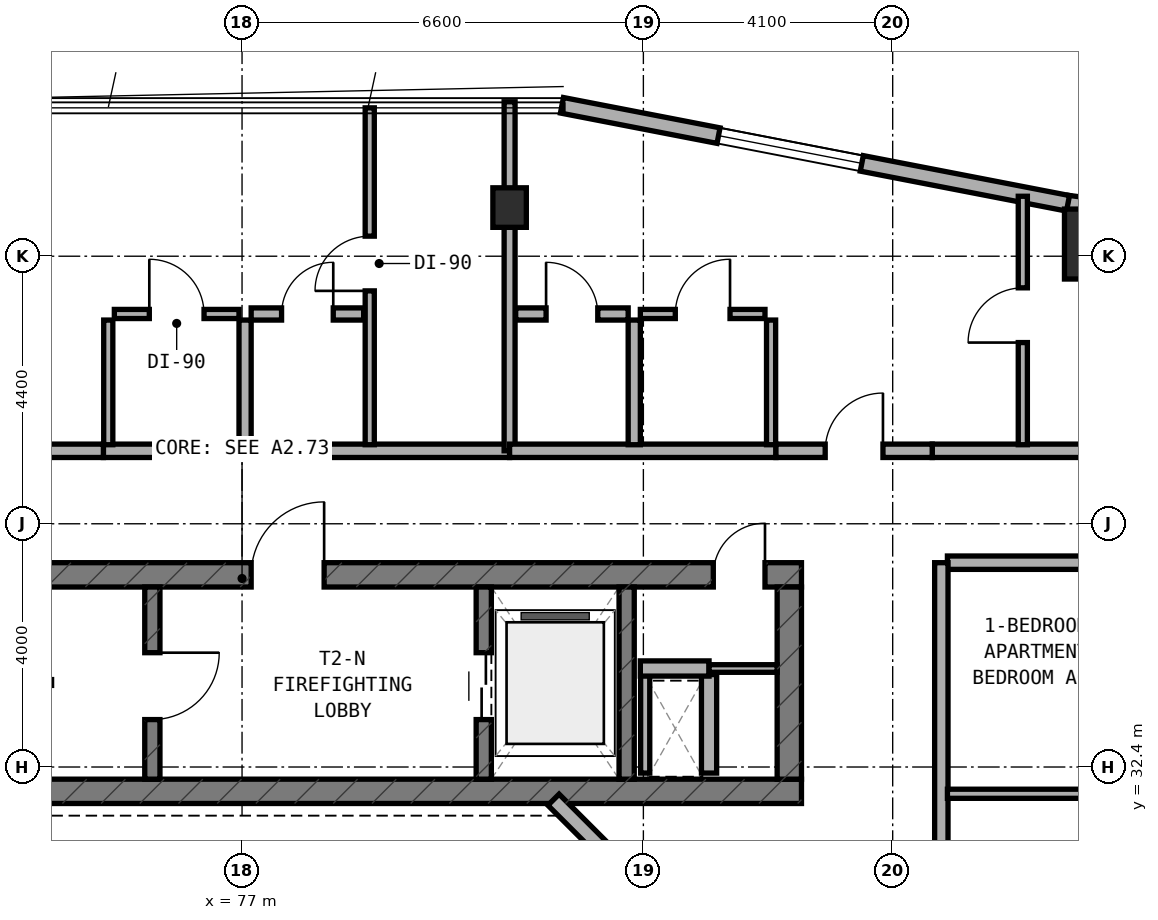
"""IFC4 building model, lengths in metres.
Left out: names, types, materials, properties, quantities, classifications, styles, units other than length and angle.
Written with IfcOpenShell. Run it as: python <this file> out.ifc"""

import sys

from ifc_helpers import new_model, si_unit, direction, frame, frame_2d, origin, origin_2d, place, context, subcontext, project, spatial, rectangle, extrude, element, fill, save


model = new_model("IFC4")
c1 = context("Model", 3, precision=1e-05, world=origin(), true_north=direction((0.0, 1.0)))
c2 = subcontext(c1, "Body", "Model", "MODEL_VIEW")
j1 = project(units=[si_unit("LENGTHUNIT", "METRE"), si_unit("PLANEANGLEUNIT", "RADIAN")], contexts=[c1])
p1 = place(None, origin())
s1 = spatial("IfcSite", under=j1, at=p1, CompositionType="ELEMENT")
p2 = place(p1, origin())
s2 = spatial("IfcBuilding", under=s1, at=p2, CompositionType="ELEMENT")
p3 = place(p2, frame((0.0, 0.0, 116.0)))
s3 = spatial("IfcBuildingStorey", under=s2, at=p3, CompositionType="ELEMENT", Elevation=116.0)
p4 = place(p3, frame((68.0, 32.0, 0.0), z_axis=(0.0, 0.0, 1.0), x_axis=(1.0, 0.0, 0.0)))
e1 = element("IfcWall", 1, at=p4, inside=s3, PredefinedType="SHEAR", context=c2, shape_type="SweptSolid", body=[
    extrude(rectangle(XDim=18.2, YDim=0.4, at=frame_2d((9.1, 0.0))), origin(), (0.0, 0.0, 1.0), 3.5),
])
p5 = place(p3, frame((68.0, 35.56, 0.0), z_axis=(0.0, 0.0, 1.0), x_axis=(1.0, 0.0, 0.0)))
e2 = element("IfcWall", 2, at=p5, inside=s3, PredefinedType="SHEAR", context=c2, shape_type="SweptSolid", body=[
    extrude(rectangle(XDim=18.2, YDim=0.4, at=frame_2d((9.1, 0.0))), origin(), (0.0, 0.0, 1.0), 3.5),
])
p6 = place(p5, frame((9.15, 0.0, 0.0)))
e3 = element("IfcOpeningElement", 3, at=p6, cuts=e2, PredefinedType="OPENING", context=c2, shape_type="SweptSolid", body=[
    extrude(rectangle(XDim=1.2, YDim=2.15, at=frame_2d((0.6, 1.075))), frame((0.0, 0.21, 0.0), z_axis=(0.0, -1.0, 0.0), x_axis=(1.0, 0.0, 0.0)), (0.0, 0.0, 1.0), 0.42),
])
p7 = place(p5, frame((16.75, 0.0, 0.0)))
e4 = element("IfcOpeningElement", 4, at=p7, cuts=e2, PredefinedType="OPENING", context=c2, shape_type="SweptSolid", body=[
    extrude(rectangle(XDim=0.85, YDim=2.1, at=frame_2d((0.425, 1.05))), frame((0.0, 0.21, 0.0), z_axis=(0.0, -1.0, 0.0), x_axis=(1.0, 0.0, 0.0)), (0.0, 0.0, 1.0), 0.42),
])
p8 = place(p3, frame((86.0, 32.2, 0.0), z_axis=(0.0, 0.0, 1.0), x_axis=(0.0, 1.0, 0.0)))
e5 = element("IfcWall", 5, at=p8, inside=s3, PredefinedType="SHEAR", context=c2, shape_type="SweptSolid", body=[
    extrude(rectangle(XDim=3.16, YDim=0.4, at=frame_2d((1.58, 0.0))), origin(), (0.0, 0.0, 1.0), 3.5),
])
p9 = place(p3, frame((75.525, 32.2, 0.0), z_axis=(0.0, 0.0, 1.0), x_axis=(0.0, 1.0, 0.0)))
e6 = element("IfcWall", 6, at=p9, inside=s3, PredefinedType="STANDARD", context=c2, shape_type="SweptSolid", body=[
    extrude(rectangle(XDim=3.16, YDim=0.25, at=frame_2d((1.58, 0.0))), origin(), (0.0, 0.0, 1.0), 3.18),
])
p10 = place(p9, frame((0.98, 0.0, 0.0)))
e7 = element("IfcOpeningElement", 7, at=p10, cuts=e6, PredefinedType="OPENING", context=c2, shape_type="SweptSolid", body=[
    extrude(rectangle(XDim=1.1, YDim=2.15, at=frame_2d((0.55, 1.075))), frame((0.0, 0.135, 0.0), z_axis=(0.0, -1.0, 0.0), x_axis=(1.0, 0.0, 0.0)), (0.0, 0.0, 1.0), 0.27),
])
p11 = place(p3, frame((80.975, 32.2, 0.0), z_axis=(0.0, 0.0, 1.0), x_axis=(0.0, 1.0, 0.0)))
e8 = element("IfcWall", 8, at=p11, inside=s3, PredefinedType="STANDARD", context=c2, shape_type="SweptSolid", body=[
    extrude(rectangle(XDim=3.16, YDim=0.25, at=frame_2d((1.58, 0.0))), origin(), (0.0, 0.0, 1.0), 3.18),
])
p12 = place(p11, frame((0.98, 0.0, 0.0)))
e9 = element("IfcOpeningElement", 9, at=p12, cuts=e8, PredefinedType="OPENING", context=c2, shape_type="SweptSolid", body=[
    extrude(rectangle(XDim=1.1, YDim=2.15, at=frame_2d((0.55, 1.075))), frame((0.0, 0.135, 0.0), z_axis=(0.0, -1.0, 0.0), x_axis=(1.0, 0.0, 0.0)), (0.0, 0.0, 1.0), 0.27),
])
p13 = place(p3, frame((83.325, 32.2, 0.0), z_axis=(0.0, 0.0, 1.0), x_axis=(0.0, 1.0, 0.0)))
e10 = element("IfcWall", 10, at=p13, inside=s3, PredefinedType="STANDARD", context=c2, shape_type="SweptSolid", body=[
    extrude(rectangle(XDim=3.16, YDim=0.25, at=frame_2d((1.58, 0.0))), origin(), (0.0, 0.0, 1.0), 3.18),
])
p14 = place(p3, frame((81.4, 41.6, 0.0), z_axis=(0.0, 0.0, 1.0), x_axis=(1.0, 0.0, 0.0)))
e11 = element("IfcColumn", 11, at=p14, inside=s3, PredefinedType="COLUMN", context=c2, shape_type="SweptSolid", body=[
    extrude(rectangle(XDim=0.55, YDim=0.65, at=origin_2d()), origin(), (0.0, 0.0, 1.0), 3.5),
])
p15 = place(p3, frame((91.0, 41.0, 0.0), z_axis=(0.0, 0.0, 1.0), x_axis=(1.0, 0.0, 0.0)))
e12 = element("IfcColumn", 12, at=p15, inside=s3, PredefinedType="COLUMN", context=c2, shape_type="SweptSolid", body=[
    extrude(rectangle(XDim=0.95, YDim=1.15, at=origin_2d()), origin(), (0.0, 0.0, 1.0), 3.5),
])
p16 = place(p3, frame((91.281, 41.579, 0.0), z_axis=(0.0, 0.0, 1.0), x_axis=(-0.991433279471, 0.130614135366, 0.0)))
e13 = element("IfcWall", 13, at=p16, inside=s3, PredefinedType="STANDARD", context=c2, shape_type="SweptSolid", body=[
    extrude(rectangle(XDim=0.712, YDim=0.26, at=frame_2d((0.356, 0.0))), origin(), (0.0, 0.0, 1.0), 3.18),
])
p17 = place(p3, frame((90.583, 41.67, 0.0), z_axis=(0.0, 0.0, 1.0), x_axis=(-0.981750199588, 0.190175039396, 0.0)))
e14 = element("IfcWall", 14, at=p17, inside=s3, PredefinedType="STANDARD", context=c2, shape_type="SweptSolid", body=[
    extrude(rectangle(XDim=8.477, YDim=0.26, at=frame_2d((4.238, 0.0))), origin(), (0.0, 0.0, 1.0), 3.18),
])
p18 = place(p17, frame((3.454, 0.0, 0.8)))
e15 = element("IfcOpeningElement", 15, at=p18, cuts=e14, PredefinedType="OPENING", context=c2, shape_type="SweptSolid", body=[
    extrude(rectangle(XDim=2.4, YDim=1.6, at=frame_2d((1.2, 0.8))), frame((0.0, 0.14, 0.0), z_axis=(0.0, -1.0, 0.0), x_axis=(1.0, 0.0, 0.0)), (0.0, 0.0, 1.0), 0.28),
])
p19 = place(p3, frame((83.756, 30.228, 0.0), z_axis=(0.0, 0.0, 1.0), x_axis=(-0.707106781187, 0.707106781187, 0.0)))
e16 = element("IfcWall", 16, at=p19, inside=s3, PredefinedType="STANDARD", context=c2, shape_type="SweptSolid", body=[
    extrude(rectangle(XDim=2.311, YDim=0.26, at=frame_2d((1.155, 0.0))), origin(), (0.0, 0.0, 1.0), 3.18),
])
p20 = place(p3, frame((83.63, 32.3, 0.0), z_axis=(0.0, 0.0, 1.0), x_axis=(0.0, 1.0, 0.0)))
e17 = element("IfcWall", 17, at=p20, inside=s3, PredefinedType="PARTITIONING", context=c2, shape_type="SweptSolid", body=[
    extrude(rectangle(XDim=1.62, YDim=0.15, at=frame_2d((0.81, 0.0))), origin(), (0.0, 0.0, 1.0), 2.755),
])
p21 = place(p3, frame((84.68, 32.3, 0.0), z_axis=(0.0, 0.0, 1.0), x_axis=(0.0, 1.0, 0.0)))
e18 = element("IfcWall", 18, at=p21, inside=s3, PredefinedType="SOLIDWALL", context=c2, shape_type="SweptSolid", body=[
    extrude(rectangle(XDim=1.62, YDim=0.25, at=frame_2d((0.81, 0.0))), origin(), (0.0, 0.0, 1.0), 3.18),
])
p22 = place(p3, frame((83.55, 34.02, 0.0), z_axis=(0.0, 0.0, 1.0), x_axis=(1.0, 0.0, 0.0)))
e19 = element("IfcWall", 19, at=p22, inside=s3, PredefinedType="SOLIDWALL", context=c2, shape_type="SweptSolid", body=[
    extrude(rectangle(XDim=1.13, YDim=0.25, at=frame_2d((0.565, 0.0))), origin(), (0.0, 0.0, 1.0), 3.18),
])
p23 = place(p3, frame((84.68, 34.02, 0.0), z_axis=(0.0, 0.0, 1.0), x_axis=(1.0, 0.0, 0.0)))
e20 = element("IfcWall", 20, at=p23, inside=s3, PredefinedType="PARTITIONING", context=c2, shape_type="SweptSolid", body=[
    extrude(rectangle(XDim=1.12, YDim=0.125, at=frame_2d((0.56, 0.0))), origin(), (0.0, 0.0, 1.0), 3.18),
])
p24 = place(p3, frame((74.72, 37.6, 0.0), z_axis=(0.0, 0.0, 1.0), x_axis=(1.0, 0.0, 0.0)))
e21 = element("IfcWall", 21, at=p24, inside=s3, PredefinedType="SOLIDWALL", context=c2, shape_type="SweptSolid", body=[
    extrude(rectangle(XDim=6.68, YDim=0.22, at=frame_2d((3.34, 0.0))), origin(), (0.0, 0.0, 1.0), 2.755),
])
p25 = place(p3, frame((65.85, 37.6, 0.0), z_axis=(0.0, 0.0, 1.0), x_axis=(1.0, 0.0, 0.0)))
e22 = element("IfcWall", 22, at=p25, inside=s3, PredefinedType="SOLIDWALL", context=c2, shape_type="SweptSolid", body=[
    extrude(rectangle(XDim=8.87, YDim=0.22, at=frame_2d((4.435, 0.0))), origin(), (0.0, 0.0, 1.0), 2.755),
])
p26 = place(p25, frame((3.96, 0.0, 0.0)))
e23 = element("IfcOpeningElement", 23, at=p26, cuts=e22, PredefinedType="OPENING", context=c2, shape_type="SweptSolid", body=[
    extrude(rectangle(XDim=0.95, YDim=2.1, at=frame_2d((0.475, 1.05))), frame((0.0, 0.12, 0.0), z_axis=(0.0, -1.0, 0.0), x_axis=(1.0, 0.0, 0.0)), (0.0, 0.0, 1.0), 0.24),
])
p27 = place(p3, frame((79.1, 37.7, 0.0), z_axis=(0.0, 0.0, 1.0), x_axis=(0.0, 1.0, 0.0)))
e24 = element("IfcWall", 24, at=p27, inside=s3, PredefinedType="PARTITIONING", context=c2, shape_type="SweptSolid", body=[
    extrude(rectangle(XDim=5.54, YDim=0.15, at=frame_2d((2.77, 0.0))), origin(), (0.0, 0.0, 1.0), 2.855),
])
p28 = place(p27, frame((2.53, 0.0, 0.0)))
e25 = element("IfcOpeningElement", 25, at=p28, cuts=e24, PredefinedType="OPENING", context=c2, shape_type="SweptSolid", body=[
    extrude(rectangle(XDim=0.9, YDim=2.1, at=frame_2d((0.45, 1.05))), frame((0.0, 0.085, 0.0), z_axis=(0.0, -1.0, 0.0), x_axis=(1.0, 0.0, 0.0)), (0.0, 0.0, 1.0), 0.17),
])
p29 = place(p3, frame((77.05, 37.7, 0.0), z_axis=(0.0, 0.0, 1.0), x_axis=(0.0, 1.0, 0.0)))
e26 = element("IfcWall", 26, at=p29, inside=s3, PredefinedType="PLUMBINGWALL", context=c2, shape_type="SweptSolid", body=[
    extrude(rectangle(XDim=2.05, YDim=0.2, at=frame_2d((1.025, 0.0))), origin(), (0.0, 0.0, 1.0), 2.855),
])
p30 = place(p3, frame((74.8, 37.7, 0.0), z_axis=(0.0, 0.0, 1.0), x_axis=(0.0, 1.0, 0.0)))
e27 = element("IfcWall", 27, at=p30, inside=s3, PredefinedType="PARTITIONING", context=c2, shape_type="SweptSolid", body=[
    extrude(rectangle(XDim=2.05, YDim=0.15, at=frame_2d((1.025, 0.0))), origin(), (0.0, 0.0, 1.0), 2.855),
])
p31 = place(p3, frame((77.15, 39.85, 0.0), z_axis=(0.0, 0.0, 1.0), x_axis=(1.0, 0.0, 0.0)))
e28 = element("IfcWall", 28, at=p31, inside=s3, PredefinedType="PLUMBINGWALL", context=c2, shape_type="SweptSolid", body=[
    extrude(rectangle(XDim=1.85, YDim=0.2, at=frame_2d((0.925, 0.0))), origin(), (0.0, 0.0, 1.0), 3.18),
])
p32 = place(p31, frame((0.5, 0.0, 0.0)))
e29 = element("IfcOpeningElement", 29, at=p32, cuts=e28, PredefinedType="OPENING", context=c2, shape_type="SweptSolid", body=[
    extrude(rectangle(XDim=0.85, YDim=2.1, at=frame_2d((0.425, 1.05))), frame((0.0, 0.11, 0.0), z_axis=(0.0, -1.0, 0.0), x_axis=(1.0, 0.0, 0.0)), (0.0, 0.0, 1.0), 0.22),
])
p33 = place(p3, frame((74.9, 39.85, 0.0), z_axis=(0.0, 0.0, 1.0), x_axis=(1.0, 0.0, 0.0)))
e30 = element("IfcWall", 30, at=p33, inside=s3, PredefinedType="PARTITIONING", context=c2, shape_type="SweptSolid", body=[
    extrude(rectangle(XDim=2.05, YDim=0.15, at=frame_2d((1.025, 0.0))), origin(), (0.0, 0.0, 1.0), 3.18),
])
p34 = place(p33, frame((0.575, 0.0, 0.0)))
e31 = element("IfcOpeningElement", 31, at=p34, cuts=e30, PredefinedType="OPENING", context=c2, shape_type="SweptSolid", body=[
    extrude(rectangle(XDim=0.9, YDim=2.1, at=frame_2d((0.45, 1.05))), frame((0.0, 0.085, 0.0), z_axis=(0.0, -1.0, 0.0), x_axis=(1.0, 0.0, 0.0)), (0.0, 0.0, 1.0), 0.17),
])
p35 = place(p3, frame((81.4, 37.6, 0.0), z_axis=(0.0, 0.0, 1.0), x_axis=(0.0, 1.0, 0.0)))
e32 = element("IfcWall", 32, at=p35, inside=s3, PredefinedType="SOLIDWALL", context=c2, shape_type="SweptSolid", body=[
    extrude(rectangle(XDim=5.74, YDim=0.18, at=frame_2d((2.87, 0.0))), origin(), (0.0, 0.0, 1.0), 2.755),
])
p36 = place(p3, frame((81.4, 37.6, 0.0), z_axis=(0.0, 0.0, 1.0), x_axis=(1.0, 0.0, 0.0)))
e33 = element("IfcWall", 33, at=p36, inside=s3, PredefinedType="SOLIDWALL", context=c2, shape_type="SweptSolid", body=[
    extrude(rectangle(XDim=4.38, YDim=0.22, at=frame_2d((2.19, 0.0))), origin(), (0.0, 0.0, 1.0), 2.755),
])
p37 = place(p3, frame((88.35, 37.6, 0.0), z_axis=(0.0, 0.0, 1.0), x_axis=(1.0, 0.0, 0.0)))
e34 = element("IfcWall", 34, at=p37, inside=s3, PredefinedType="SOLIDWALL", context=c2, shape_type="SweptSolid", body=[
    extrude(rectangle(XDim=6.29, YDim=0.22, at=frame_2d((3.145, 0.0))), origin(), (0.0, 0.0, 1.0), 2.875),
])
p38 = place(p3, frame((85.78, 37.6, 0.0), z_axis=(0.0, 0.0, 1.0), x_axis=(1.0, 0.0, 0.0)))
e35 = element("IfcWall", 35, at=p38, inside=s3, PredefinedType="SOLIDWALL", context=c2, shape_type="SweptSolid", body=[
    extrude(rectangle(XDim=2.57, YDim=0.22, at=frame_2d((1.285, 0.0))), origin(), (0.0, 0.0, 1.0), 3.18),
])
p39 = place(p38, frame((0.81, 0.0, 0.0)))
e36 = element("IfcOpeningElement", 36, at=p39, cuts=e35, PredefinedType="OPENING", context=c2, shape_type="SweptSolid", body=[
    extrude(rectangle(XDim=0.95, YDim=2.1, at=frame_2d((0.475, 1.05))), frame((0.0, 0.12, 0.0), z_axis=(0.0, -1.0, 0.0), x_axis=(1.0, 0.0, 0.0)), (0.0, 0.0, 1.0), 0.24),
])
p40 = place(p3, frame((89.84, 37.7, 0.0), z_axis=(0.0, 0.0, 1.0), x_axis=(0.0, 1.0, 0.0)))
e37 = element("IfcWall", 37, at=p40, inside=s3, PredefinedType="PARTITIONING", context=c2, shape_type="SweptSolid", body=[
    extrude(rectangle(XDim=4.086, YDim=0.15, at=frame_2d((2.043, 0.0))), origin(), (0.0, 0.0, 1.0), 2.875),
])
p41 = place(p40, frame((1.68, 0.0, 0.0)))
e38 = element("IfcOpeningElement", 38, at=p41, cuts=e37, PredefinedType="OPENING", context=c2, shape_type="SweptSolid", body=[
    extrude(rectangle(XDim=0.9, YDim=2.1, at=frame_2d((0.45, 1.05))), frame((0.0, 0.085, 0.0), z_axis=(0.0, -1.0, 0.0), x_axis=(1.0, 0.0, 0.0)), (0.0, 0.0, 1.0), 0.17),
])
p42 = place(p3, frame((83.45, 37.7, 0.0), z_axis=(0.0, 0.0, 1.0), x_axis=(0.0, 1.0, 0.0)))
e39 = element("IfcWall", 39, at=p42, inside=s3, PredefinedType="PLUMBINGWALL", context=c2, shape_type="SweptSolid", body=[
    extrude(rectangle(XDim=2.05, YDim=0.2, at=frame_2d((1.025, 0.0))), origin(), (0.0, 0.0, 1.0), 3.18),
])
p43 = place(p3, frame((85.7, 37.7, 0.0), z_axis=(0.0, 0.0, 1.0), x_axis=(0.0, 1.0, 0.0)))
e40 = element("IfcWall", 40, at=p43, inside=s3, PredefinedType="PARTITIONING", context=c2, shape_type="SweptSolid", body=[
    extrude(rectangle(XDim=2.05, YDim=0.15, at=frame_2d((1.025, 0.0))), origin(), (0.0, 0.0, 1.0), 3.18),
])
p44 = place(p3, frame((81.5, 39.85, 0.0), z_axis=(0.0, 0.0, 1.0), x_axis=(1.0, 0.0, 0.0)))
e41 = element("IfcWall", 41, at=p44, inside=s3, PredefinedType="PLUMBINGWALL", context=c2, shape_type="SweptSolid", body=[
    extrude(rectangle(XDim=1.85, YDim=0.2, at=frame_2d((0.925, 0.0))), origin(), (0.0, 0.0, 1.0), 2.755),
])
p45 = place(p44, frame((0.5, 0.0, 0.0)))
e42 = element("IfcOpeningElement", 42, at=p45, cuts=e41, PredefinedType="OPENING", context=c2, shape_type="SweptSolid", body=[
    extrude(rectangle(XDim=0.85, YDim=2.1, at=frame_2d((0.425, 1.05))), frame((0.0, 0.11, 0.0), z_axis=(0.0, -1.0, 0.0), x_axis=(1.0, 0.0, 0.0)), (0.0, 0.0, 1.0), 0.22),
])
p46 = place(p3, frame((83.55, 39.85, 0.0), z_axis=(0.0, 0.0, 1.0), x_axis=(1.0, 0.0, 0.0)))
e43 = element("IfcWall", 43, at=p46, inside=s3, PredefinedType="PARTITIONING", context=c2, shape_type="SweptSolid", body=[
    extrude(rectangle(XDim=2.05, YDim=0.15, at=frame_2d((1.025, 0.0))), origin(), (0.0, 0.0, 1.0), 3.18),
])
p47 = place(p46, frame((0.575, 0.0, 0.0)))
e44 = element("IfcOpeningElement", 44, at=p47, cuts=e43, PredefinedType="OPENING", context=c2, shape_type="SweptSolid", body=[
    extrude(rectangle(XDim=0.9, YDim=2.1, at=frame_2d((0.45, 1.05))), frame((0.0, 0.085, 0.0), z_axis=(0.0, -1.0, 0.0), x_axis=(1.0, 0.0, 0.0)), (0.0, 0.0, 1.0), 0.17),
])
p48 = place(p3, frame((88.6, 35.76, 0.0), z_axis=(0.0, 0.0, 1.0), x_axis=(1.0, 0.0, 0.0)))
e45 = element("IfcWall", 45, at=p48, inside=s3, PredefinedType="SOLIDWALL", context=c2, shape_type="SweptSolid", body=[
    extrude(rectangle(XDim=5.88, YDim=0.22, at=frame_2d((2.94, 0.0))), origin(), (0.0, 0.0, 1.0), 2.875),
])
p49 = place(p3, frame((88.5, 27.9, 0.0), z_axis=(0.0, 0.0, 1.0), x_axis=(0.0, 1.0, 0.0)))
e46 = element("IfcWall", 46, at=p49, inside=s3, PredefinedType="SOLIDWALL", context=c2, shape_type="SweptSolid", body=[
    extrude(rectangle(XDim=7.86, YDim=0.22, at=frame_2d((3.93, 0.0))), origin(), (0.0, 0.0, 1.0), 2.755),
])
p50 = place(p49, frame((1.555, 0.0, 0.0)))
e47 = element("IfcOpeningElement", 47, at=p50, cuts=e46, PredefinedType="OPENING", context=c2, shape_type="SweptSolid", body=[
    extrude(rectangle(XDim=0.95, YDim=2.1, at=frame_2d((0.475, 1.05))), frame((0.0, 0.12, 0.0), z_axis=(0.0, -1.0, 0.0), x_axis=(1.0, 0.0, 0.0)), (0.0, 0.0, 1.0), 0.24),
])
p51 = place(p3, frame((88.6, 31.96, 0.0), z_axis=(0.0, 0.0, 1.0), x_axis=(1.0, 0.0, 0.0)))
e48 = element("IfcWall", 48, at=p51, inside=s3, PredefinedType="PARTITIONING", context=c2, shape_type="SweptSolid", body=[
    extrude(rectangle(XDim=5.94, YDim=0.15, at=frame_2d((2.97, 0.0))), origin(), (0.0, 0.0, 1.0), 2.875),
])
p52 = place(p51, frame((2.45, 0.0, 0.0)))
e49 = element("IfcOpeningElement", 49, at=p52, cuts=e48, PredefinedType="OPENING", context=c2, shape_type="SweptSolid", body=[
    extrude(rectangle(XDim=0.9, YDim=2.1, at=frame_2d((0.45, 1.05))), frame((0.0, 0.085, 0.0), z_axis=(0.0, -1.0, 0.0), x_axis=(1.0, 0.0, 0.0)), (0.0, 0.0, 1.0), 0.17),
])
p53 = place(p18, origin())
e50 = element("IfcWindow", 50, at=p53, inside=s3, PartitioningType="SINGLE_PANEL", PredefinedType="WINDOW", context=c2, shape_type="SweptSolid", body=[
    extrude(rectangle(XDim=2.4, YDim=1.6, at=frame_2d((1.2, 0.8))), frame((0.0, 0.03, 0.0), z_axis=(0.0, -1.0, 0.0), x_axis=(1.0, 0.0, 0.0)), (0.0, 0.0, 1.0), 0.06),
])
fill(e15, e50)
p54 = place(p10, frame((1.1, 0.0, 0.0), z_axis=(0.0, 0.0, 1.0), x_axis=(-1.0, 0.0, 0.0)))
e51 = element("IfcDoor", 51, at=p54, inside=s3, OperationType="SINGLE_SWING_LEFT", PredefinedType="DOOR", context=c2, shape_type="SweptSolid", body=[
    extrude(rectangle(XDim=1.1, YDim=2.15, at=frame_2d((0.55, 1.075))), frame((0.0, 0.025, 0.0), z_axis=(0.0, -1.0, 0.0), x_axis=(1.0, 0.0, 0.0)), (0.0, 0.0, 1.0), 0.05),
])
fill(e7, e51)
p55 = place(p6, origin())
e52 = element("IfcDoor", 52, at=p55, inside=s3, OperationType="SINGLE_SWING_RIGHT", PredefinedType="DOOR", context=c2, shape_type="SweptSolid", body=[
    extrude(rectangle(XDim=1.2, YDim=2.15, at=frame_2d((0.6, 1.075))), frame((0.0, 0.025, 0.0), z_axis=(0.0, -1.0, 0.0), x_axis=(1.0, 0.0, 0.0)), (0.0, 0.0, 1.0), 0.05),
])
fill(e3, e52)
p56 = place(p12, origin())
e53 = element("IfcDoor", 53, at=p56, inside=s3, OperationType="DOUBLE_DOOR_SLIDING", PredefinedType="DOOR", context=c2, shape_type="SweptSolid", body=[
    extrude(rectangle(XDim=1.1, YDim=2.15, at=frame_2d((0.55, 1.075))), frame((0.0, 0.025, 0.0), z_axis=(0.0, -1.0, 0.0), x_axis=(1.0, 0.0, 0.0)), (0.0, 0.0, 1.0), 0.05),
])
fill(e9, e53)
p57 = place(p7, origin())
e54 = element("IfcDoor", 54, at=p57, inside=s3, OperationType="SINGLE_SWING_RIGHT", PredefinedType="DOOR", context=c2, shape_type="SweptSolid", body=[
    extrude(rectangle(XDim=0.85, YDim=2.1, at=frame_2d((0.425, 1.05))), frame((0.0, 0.025, 0.0), z_axis=(0.0, -1.0, 0.0), x_axis=(1.0, 0.0, 0.0)), (0.0, 0.0, 1.0), 0.05),
])
fill(e4, e54)
p58 = place(p28, origin())
e55 = element("IfcDoor", 55, at=p58, inside=s3, OperationType="SINGLE_SWING_LEFT", PredefinedType="DOOR", context=c2, shape_type="SweptSolid", body=[
    extrude(rectangle(XDim=0.9, YDim=2.1, at=frame_2d((0.45, 1.05))), frame((0.0, 0.025, 0.0), z_axis=(0.0, -1.0, 0.0), x_axis=(1.0, 0.0, 0.0)), (0.0, 0.0, 1.0), 0.05),
])
fill(e25, e55)
p59 = place(p32, origin())
e56 = element("IfcDoor", 56, at=p59, inside=s3, OperationType="SINGLE_SWING_RIGHT", PredefinedType="DOOR", context=c2, shape_type="SweptSolid", body=[
    extrude(rectangle(XDim=0.85, YDim=2.1, at=frame_2d((0.425, 1.05))), frame((0.0, 0.025, 0.0), z_axis=(0.0, -1.0, 0.0), x_axis=(1.0, 0.0, 0.0)), (0.0, 0.0, 1.0), 0.05),
])
fill(e29, e56)
p60 = place(p34, origin())
e57 = element("IfcDoor", 57, at=p60, inside=s3, OperationType="SINGLE_SWING_LEFT", PredefinedType="DOOR", context=c2, shape_type="SweptSolid", body=[
    extrude(rectangle(XDim=0.9, YDim=2.1, at=frame_2d((0.45, 1.05))), frame((0.0, 0.025, 0.0), z_axis=(0.0, -1.0, 0.0), x_axis=(1.0, 0.0, 0.0)), (0.0, 0.0, 1.0), 0.05),
])
fill(e31, e57)
p61 = place(p39, origin())
e58 = element("IfcDoor", 58, at=p61, inside=s3, OperationType="SINGLE_SWING_RIGHT", PredefinedType="DOOR", context=c2, shape_type="SweptSolid", body=[
    extrude(rectangle(XDim=0.95, YDim=2.1, at=frame_2d((0.475, 1.05))), frame((0.0, 0.025, 0.0), z_axis=(0.0, -1.0, 0.0), x_axis=(1.0, 0.0, 0.0)), (0.0, 0.0, 1.0), 0.05),
])
fill(e36, e58)
p62 = place(p41, origin())
e59 = element("IfcDoor", 59, at=p62, inside=s3, OperationType="SINGLE_SWING_LEFT", PredefinedType="DOOR", context=c2, shape_type="SweptSolid", body=[
    extrude(rectangle(XDim=0.9, YDim=2.1, at=frame_2d((0.45, 1.05))), frame((0.0, 0.025, 0.0), z_axis=(0.0, -1.0, 0.0), x_axis=(1.0, 0.0, 0.0)), (0.0, 0.0, 1.0), 0.05),
])
fill(e38, e59)
p63 = place(p45, origin())
e60 = element("IfcDoor", 60, at=p63, inside=s3, OperationType="SINGLE_SWING_LEFT", PredefinedType="DOOR", context=c2, shape_type="SweptSolid", body=[
    extrude(rectangle(XDim=0.85, YDim=2.1, at=frame_2d((0.425, 1.05))), frame((0.0, 0.025, 0.0), z_axis=(0.0, -1.0, 0.0), x_axis=(1.0, 0.0, 0.0)), (0.0, 0.0, 1.0), 0.05),
])
fill(e42, e60)
p64 = place(p47, origin())
e61 = element("IfcDoor", 61, at=p64, inside=s3, OperationType="SINGLE_SWING_RIGHT", PredefinedType="DOOR", context=c2, shape_type="SweptSolid", body=[
    extrude(rectangle(XDim=0.9, YDim=2.1, at=frame_2d((0.45, 1.05))), frame((0.0, 0.025, 0.0), z_axis=(0.0, -1.0, 0.0), x_axis=(1.0, 0.0, 0.0)), (0.0, 0.0, 1.0), 0.05),
])
fill(e44, e61)
save(model, sys.argv[1])
